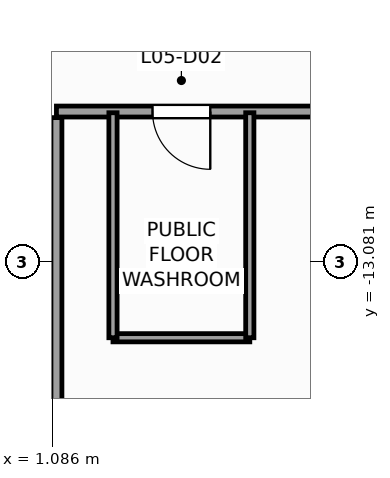
"""IFC4 building model, lengths in metres.
Left out: names, types, materials, properties, quantities, classifications, styles, units other than length and angle.
Written with IfcOpenShell. Run it as: python <this file> out.ifc"""

import sys

from ifc_helpers import new_model, si_unit, direction, frame, frame_2d, origin, place, context, subcontext, project, spatial, rectangle, extrude, source, transform, mapped, element, fill, save


model = new_model("IFC4")
c1 = context("Model", 3, precision=1e-05, world=origin(), true_north=direction((0.0, 1.0)))
c2 = subcontext(c1, "Body", "Model", "MODEL_VIEW")
j1 = project(units=[si_unit("LENGTHUNIT", "METRE"), si_unit("PLANEANGLEUNIT", "RADIAN")], contexts=[c1])
p1 = place(None, origin())
s1 = spatial("IfcSite", under=j1, at=p1, CompositionType="ELEMENT")
p2 = place(p1, origin())
s2 = spatial("IfcBuilding", under=s1, at=p2, CompositionType="ELEMENT")
p3 = place(p2, frame((0.0, 0.0, 26.0)))
s3 = spatial("IfcBuildingStorey", under=s2, at=p3, CompositionType="ELEMENT", Elevation=26.0)
p4 = place(p3, frame((1.15, -10.6, 0.0), z_axis=(0.0, 0.0, 1.0), x_axis=(1.0, 0.0, 0.0)))
e1 = element("IfcWall", 1, at=p4, inside=s3, PredefinedType="PARTITIONING", context=c2, shape_type="SweptSolid", body=[
    extrude(rectangle(XDim=9.45, YDim=0.18, at=frame_2d((4.725, 0.0))), origin(), (0.0, 0.0, 1.0), 3.72),
])
p5 = place(p4, frame((1.58, 0.0, 0.0)))
e2 = element("IfcOpeningElement", 2, at=p5, cuts=e1, PredefinedType="OPENING", context=c2, shape_type="SweptSolid", body=[
    extrude(rectangle(XDim=0.95, YDim=2.1, at=frame_2d((0.475, 1.05))), frame((0.0, 0.1, 0.0), z_axis=(0.0, -1.0, 0.0), x_axis=(1.0, 0.0, 0.0)), (0.0, 0.0, 1.0), 0.2),
])
p6 = place(p3, frame((1.15, -28.685, 0.0), z_axis=(0.0, 0.0, 1.0), x_axis=(0.0, 1.0, 0.0)))
e3 = element("IfcWall", 3, at=p6, inside=s3, PredefinedType="PARTITIONING", context=c2, shape_type="SweptSolid", body=[
    extrude(rectangle(XDim=17.985, YDim=0.18, at=frame_2d((8.993, 0.0))), origin(), (0.0, 0.0, 1.0), 3.72),
])
p7 = place(p3, frame((2.08, -14.32, 0.0), z_axis=(0.0, 0.0, 1.0), x_axis=(1.0, 0.0, 0.0)))
e4 = element("IfcWall", 4, at=p7, inside=s3, PredefinedType="PARTITIONING", context=c2, shape_type="SweptSolid", body=[
    extrude(rectangle(XDim=2.25, YDim=0.135, at=frame_2d((1.125, 0.0))), origin(), (0.0, 0.0, 1.0), 3.72),
])
for number, where, z_axis, x_axis in (
    (5, (4.33, -14.32, 0.0), (0.0, 0.0, 1.0), (0.0, 1.0, 0.0)),
    (6, (2.08, -14.32, 0.0), (0.0, 0.0, 1.0), (0.0, 1.0, 0.0)),
):
    element("IfcWall", number, at=place(p3, frame(where, z_axis=z_axis, x_axis=x_axis)), inside=s3, PredefinedType="PARTITIONING", context=c2, shape_type="SweptSolid", body=[
        extrude(rectangle(XDim=3.7, YDim=0.135, at=frame_2d((1.85, 0.0))), origin(), (0.0, 0.0, 1.0), 3.72),
    ])
m1 = source(origin(), c2, "Body", "SweptSolid", [
    extrude(rectangle(XDim=0.95, YDim=2.1, at=frame_2d((0.475, 1.05))), frame((0.0, 0.025, 0.0), z_axis=(0.0, -1.0, 0.0), x_axis=(1.0, 0.0, 0.0)), (0.0, 0.0, 1.0), 0.05),
])
p8 = place(p5, frame((0.95, 0.0, 0.0), z_axis=(0.0, 0.0, 1.0), x_axis=(-1.0, 0.0, 0.0)))
e7 = element("IfcDoor", 7, at=p8, inside=s3, OperationType="SINGLE_SWING_RIGHT", PredefinedType="DOOR", context=c2, shape_type="MappedRepresentation", body=[
    mapped(m1, transform((0.0, 0.0, 0.0), scale=1.0)),
])
fill(e2, e7)
save(model, sys.argv[1])
